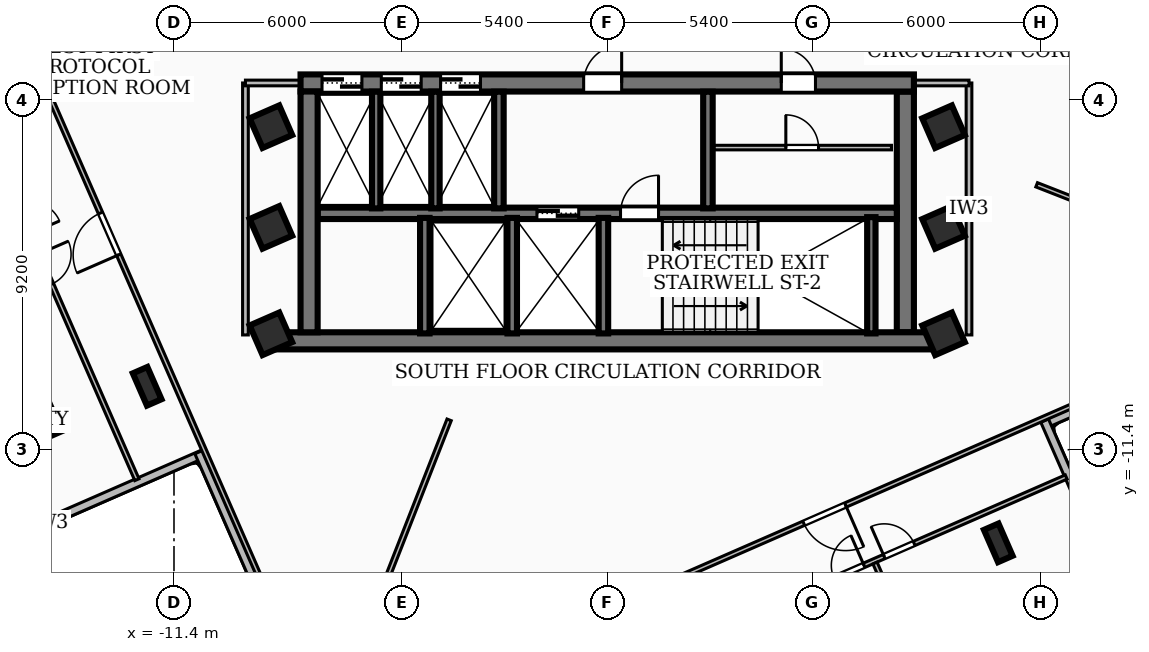
"""IFC4 building model, lengths in metres.
Left out: names, types, materials, properties, quantities, classifications, styles, units other than length and angle.
Written with IfcOpenShell. Run it as: python <this file> out.ifc"""

import sys

from ifc_helpers import new_model, si_unit, direction, frame, frame_2d, origin, origin_2d, place, context, subcontext, project, spatial, rectangle, i_section, extrude, element, fill, save


model = new_model("IFC4")
c1 = context("Model", 3, precision=1e-05, world=origin(), true_north=direction((0.0, 1.0)))
c2 = subcontext(c1, "Body", "Model", "MODEL_VIEW")
j1 = project(units=[si_unit("LENGTHUNIT", "METRE"), si_unit("PLANEANGLEUNIT", "RADIAN")], contexts=[c1])
p1 = place(None, origin())
s1 = spatial("IfcSite", under=j1, at=p1, CompositionType="ELEMENT")
p2 = place(p1, origin())
s2 = spatial("IfcBuilding", under=s1, at=p2, CompositionType="ELEMENT")
p3 = place(p2, frame((0.0, 0.0, 181.08)))
s3 = spatial("IfcBuildingStorey", under=s2, at=p3, CompositionType="ELEMENT", Elevation=181.08)
p4 = place(p3, frame((8.78, -8.535, 0.0), z_axis=(0.0, 0.0, 1.0), x_axis=(-1.0, 0.0, 0.0)))
e1 = element("IfcWall", 1, at=p4, inside=s3, PredefinedType="SHEAR", context=c2, shape_type="SweptSolid", body=[
    extrude(rectangle(XDim=17.56, YDim=0.45, at=frame_2d((8.78, 0.0))), origin(), (0.0, 0.0, 1.0), 3.34),
])
p5 = place(p3, frame((-8.07, -1.75, 0.0), z_axis=(0.0, 0.0, 1.0), x_axis=(1.0, 0.0, 0.0)))
e2 = element("IfcWall", 2, at=p5, inside=s3, PredefinedType="SHEAR", context=c2, shape_type="SweptSolid", body=[
    extrude(rectangle(XDim=16.14, YDim=0.45, at=frame_2d((8.07, 0.0))), origin(), (0.0, 0.0, 1.0), 3.34),
])
p6 = place(p5, frame((7.45, 0.0, 0.0)))
e3 = element("IfcOpeningElement", 3, at=p6, cuts=e2, PredefinedType="OPENING", context=c2, shape_type="SweptSolid", body=[
    extrude(rectangle(XDim=1.0, YDim=2.1, at=frame_2d((0.5, 1.05))), frame((0.0, 0.235, 0.0), z_axis=(0.0, -1.0, 0.0), x_axis=(1.0, 0.0, 0.0)), (0.0, 0.0, 1.0), 0.47),
])
p7 = place(p5, frame((12.65, 0.0, 0.0)))
e4 = element("IfcOpeningElement", 4, at=p7, cuts=e2, PredefinedType="OPENING", context=c2, shape_type="SweptSolid", body=[
    extrude(rectangle(XDim=0.9, YDim=2.06, at=frame_2d((0.45, 1.03))), frame((0.0, 0.235, 0.0), z_axis=(0.0, -1.0, 0.0), x_axis=(1.0, 0.0, 0.0)), (0.0, 0.0, 1.0), 0.47),
])
p8 = place(p5, frame((0.565, 0.0, 0.0)))
e5 = element("IfcOpeningElement", 5, at=p8, cuts=e2, PredefinedType="OPENING", context=c2, shape_type="SweptSolid", body=[
    extrude(rectangle(XDim=1.05, YDim=2.15, at=frame_2d((0.525, 1.075))), frame((0.0, 0.235, 0.0), z_axis=(0.0, -1.0, 0.0), x_axis=(1.0, 0.0, 0.0)), (0.0, 0.0, 1.0), 0.47),
])
p9 = place(p5, frame((2.125, 0.0, 0.0)))
e6 = element("IfcOpeningElement", 6, at=p9, cuts=e2, PredefinedType="OPENING", context=c2, shape_type="SweptSolid", body=[
    extrude(rectangle(XDim=1.05, YDim=2.15, at=frame_2d((0.525, 1.075))), frame((0.0, 0.235, 0.0), z_axis=(0.0, -1.0, 0.0), x_axis=(1.0, 0.0, 0.0)), (0.0, 0.0, 1.0), 0.47),
])
p10 = place(p5, frame((3.685, 0.0, 0.0)))
e7 = element("IfcOpeningElement", 7, at=p10, cuts=e2, PredefinedType="OPENING", context=c2, shape_type="SweptSolid", body=[
    extrude(rectangle(XDim=1.05, YDim=2.15, at=frame_2d((0.525, 1.075))), frame((0.0, 0.235, 0.0), z_axis=(0.0, -1.0, 0.0), x_axis=(1.0, 0.0, 0.0)), (0.0, 0.0, 1.0), 0.47),
])
for number, where, z_axis, x_axis in (
    (8, (-7.845, -8.31, 0.0), (0.0, 0.0, 1.0), (0.0, 1.0, 0.0)),
    (9, (7.845, -1.975, 0.0), (0.0, 0.0, 1.0), (0.0, -1.0, 0.0)),
):
    element("IfcWall", number, at=place(p3, frame(where, z_axis=z_axis, x_axis=x_axis)), inside=s3, PredefinedType="SHEAR", context=c2, shape_type="SweptSolid", body=[
        extrude(rectangle(XDim=6.335, YDim=0.45, at=frame_2d((3.167, 0.0))), origin(), (0.0, 0.0, 1.0), 3.34),
    ])
p11 = place(p3, frame((-7.62, -5.18, 0.0), z_axis=(0.0, 0.0, 1.0), x_axis=(1.0, 0.0, 0.0)))
e10 = element("IfcWall", 10, at=p11, inside=s3, PredefinedType="SOLIDWALL", context=c2, shape_type="SweptSolid", body=[
    extrude(rectangle(XDim=15.24, YDim=0.3, at=frame_2d((7.62, 0.0))), origin(), (0.0, 0.0, 1.0), 3.34),
])
p12 = place(p11, frame((5.77, 0.0, 0.0)))
e11 = element("IfcOpeningElement", 11, at=p12, cuts=e10, PredefinedType="OPENING", context=c2, shape_type="SweptSolid", body=[
    extrude(rectangle(XDim=1.1, YDim=2.15, at=frame_2d((0.55, 1.075))), frame((0.0, 0.16, 0.0), z_axis=(0.0, -1.0, 0.0), x_axis=(1.0, 0.0, 0.0)), (0.0, 0.0, 1.0), 0.32),
])
p13 = place(p11, frame((7.97, 0.0, 0.0)))
e12 = element("IfcOpeningElement", 12, at=p13, cuts=e10, PredefinedType="OPENING", context=c2, shape_type="SweptSolid", body=[
    extrude(rectangle(XDim=1.0, YDim=2.1, at=frame_2d((0.5, 1.05))), frame((0.0, 0.16, 0.0), z_axis=(0.0, -1.0, 0.0), x_axis=(1.0, 0.0, 0.0)), (0.0, 0.0, 1.0), 0.32),
])
p14 = place(p3, frame((6.95, -8.34, 0.0), z_axis=(0.0, 0.0, 1.0), x_axis=(0.0, 1.0, 0.0)))
e13 = element("IfcWall", 13, at=p14, inside=s3, PredefinedType="SOLIDWALL", context=c2, shape_type="SweptSolid", body=[
    extrude(rectangle(XDim=3.06, YDim=0.22, at=frame_2d((1.53, 0.0))), origin(), (0.0, 0.0, 1.0), 3.34),
])
for number, where, z_axis, x_axis in (
    (14, (-0.1, -8.34, 0.0), (0.0, 0.0, 1.0), (0.0, 1.0, 0.0)),
    (15, (-2.5, -8.34, 0.0), (0.0, 0.0, 1.0), (0.0, 1.0, 0.0)),
    (16, (-4.8, -8.34, 0.0), (0.0, 0.0, 1.0), (0.0, 1.0, 0.0)),
):
    element("IfcWall", number, at=place(p3, frame(where, z_axis=z_axis, x_axis=x_axis)), inside=s3, PredefinedType="SOLIDWALL", context=c2, shape_type="SweptSolid", body=[
        extrude(rectangle(XDim=3.04, YDim=0.25, at=frame_2d((1.52, 0.0))), origin(), (0.0, 0.0, 1.0), 3.34),
    ])
for number, where, z_axis, x_axis in (
    (17, (-2.85, -5.05, 0.0), (0.0, 0.0, 1.0), (0.0, 1.0, 0.0)),
    (18, (2.65, -5.05, 0.0), (0.0, 0.0, 1.0), (0.0, 1.0, 0.0)),
):
    element("IfcWall", number, at=place(p3, frame(where, z_axis=z_axis, x_axis=x_axis)), inside=s3, PredefinedType="SOLIDWALL", context=c2, shape_type="SweptSolid", body=[
        extrude(rectangle(XDim=3.07, YDim=0.25, at=frame_2d((1.535, 0.0))), origin(), (0.0, 0.0, 1.0), 3.34),
    ])
for number, where, z_axis, x_axis in (
    (19, (-6.08, -5.05, 0.0), (0.0, 0.0, 1.0), (0.0, 1.0, 0.0)),
    (20, (-4.52, -5.05, 0.0), (0.0, 0.0, 1.0), (0.0, 1.0, 0.0)),
):
    element("IfcWall", number, at=place(p3, frame(where, z_axis=z_axis, x_axis=x_axis)), inside=s3, PredefinedType="SOLIDWALL", context=c2, shape_type="SweptSolid", body=[
        extrude(rectangle(XDim=3.07, YDim=0.22, at=frame_2d((1.535, 0.0))), origin(), (0.0, 0.0, 1.0), 3.34),
    ])
for number, where, z_axis, x_axis in (
    (21, (-8.85, -5.55, 0.0), (0.0, 0.0, 1.0), (0.916, 0.4, 0.0)),
    (22, (-8.85, -2.9, 0.0), (0.0, 0.0, 1.0), (0.916, 0.4, 0.0)),
    (23, (8.85, -5.55, 0.0), (0.0, 0.0, 1.0), (0.916, 0.4, 0.0)),
    (24, (8.85, -2.9, 0.0), (0.0, 0.0, 1.0), (0.916, 0.4, 0.0)),
    (25, (8.85, -8.35, 0.0), (0.0, 0.0, 1.0), (0.916, 0.4, 0.0)),
    (26, (-8.85, -8.35, 0.0), (0.0, 0.0, 1.0), (0.916, 0.4, 0.0)),
):
    element("IfcColumn", number, at=place(p3, frame(where, z_axis=z_axis, x_axis=x_axis)), inside=s3, PredefinedType="COLUMN", context=c2, shape_type="SweptSolid", body=[
        extrude(rectangle(XDim=0.85, YDim=0.85, at=origin_2d()), origin(), (0.0, 0.0, 1.0), 3.6),
    ])
for number, where, z_axis, x_axis in (
    (27, (-12.106, -9.731, 0.0), (0.0, 0.0, 1.0), (0.916, 0.4, 0.0)),
    (28, (-14.731, -10.573, 0.0), (0.0, 0.0, 1.0), (0.916, 0.4, 0.0)),
    (29, (10.29, -13.85, 0.0), (0.0, 0.0, 1.0), (0.916, 0.4, 0.0)),
):
    element("IfcColumn", number, at=place(p3, frame(where, z_axis=z_axis, x_axis=x_axis)), inside=s3, PredefinedType="COLUMN", context=c2, shape_type="SweptSolid", body=[
        extrude(i_section(OverallWidth=0.418, OverallDepth=0.927, WebThickness=0.019, FlangeThickness=0.032, at=origin_2d()), origin(), (0.0, 0.0, 1.0), 3.6),
    ])
p15 = place(p3, frame((-10.634, -11.51, 0.0), z_axis=(0.0, 0.0, 1.0), x_axis=(-0.91637186732, -0.400328116405, 0.0)))
e30 = element("IfcWall", 30, at=p15, inside=s3, PredefinedType="SOLIDWALL", context=c2, shape_type="SweptSolid", body=[
    extrude(rectangle(XDim=9.058, YDim=0.22, at=frame_2d((4.529, 0.0))), origin(), (0.0, 0.0, 1.0), 3.34),
])
p16 = place(p15, frame((6.157, 0.0, 0.85)))
e31 = element("IfcOpeningElement", 31, at=p16, cuts=e30, PredefinedType="OPENING", context=c2, shape_type="SweptSolid", body=[
    extrude(rectangle(XDim=1.8, YDim=1.8, at=frame_2d((0.9, 0.9))), frame((0.0, 0.12, 0.0), z_axis=(0.0, -1.0, 0.0), x_axis=(1.0, 0.0, 0.0)), (0.0, 0.0, 1.0), 0.24),
])
p17 = place(p3, frame((17.658, -8.044, 0.0), z_axis=(0.0, 0.0, 1.0), x_axis=(-0.916361145567, -0.400352658158, 0.0)))
e32 = element("IfcWall", 32, at=p17, inside=s3, PredefinedType="SOLIDWALL", context=c2, shape_type="SweptSolid", body=[
    extrude(rectangle(XDim=6.759, YDim=0.22, at=frame_2d((3.38, 0.0))), origin(), (0.0, 0.0, 1.0), 3.34),
])
p18 = place(p3, frame((11.51, -10.634, 0.0), z_axis=(0.0, 0.0, 1.0), x_axis=(0.400392901903, -0.916343562266, 0.0)))
e33 = element("IfcWall", 33, at=p18, inside=s3, PredefinedType="SOLIDWALL", context=c2, shape_type="SweptSolid", body=[
    extrude(rectangle(XDim=7.458, YDim=0.22, at=frame_2d((3.729, 0.0))), origin(), (0.0, 0.0, 1.0), 3.34),
])
p19 = place(p3, frame((-8.044, -17.658, 0.0), z_axis=(0.0, 0.0, 1.0), x_axis=(-0.400352658158, 0.916361145567, 0.0)))
e34 = element("IfcWall", 34, at=p19, inside=s3, PredefinedType="SOLIDWALL", context=c2, shape_type="SweptSolid", body=[
    extrude(rectangle(XDim=6.759, YDim=0.22, at=frame_2d((3.38, 0.0))), origin(), (0.0, 0.0, 1.0), 3.34),
])
p20 = place(p3, frame((2.8, -3.45, 0.0), z_axis=(0.0, 0.0, 1.0), x_axis=(1.0, 0.0, 0.0)))
e35 = element("IfcWall", 35, at=p20, inside=s3, PredefinedType="PARTITIONING", context=c2, shape_type="SweptSolid", body=[
    extrude(rectangle(XDim=4.68, YDim=0.12, at=frame_2d((2.34, 0.0))), origin(), (0.0, 0.0, 1.0), 3.34),
])
p21 = place(p20, frame((1.9, 0.0, 0.0)))
e36 = element("IfcOpeningElement", 36, at=p21, cuts=e35, PredefinedType="OPENING", context=c2, shape_type="SweptSolid", body=[
    extrude(rectangle(XDim=0.86, YDim=2.04, at=frame_2d((0.43, 1.02))), frame((0.0, 0.07, 0.0), z_axis=(0.0, -1.0, 0.0), x_axis=(1.0, 0.0, 0.0)), (0.0, 0.0, 1.0), 0.14),
])
p22 = place(p3, frame((-9.52, -8.38, 0.0), z_axis=(0.0, 0.0, 1.0), x_axis=(0.0, 1.0, 0.0)))
e37 = element("IfcWall", 37, at=p22, inside=s3, PredefinedType="PARTITIONING", context=c2, shape_type="SweptSolid", body=[
    extrude(rectangle(XDim=6.63, YDim=0.15, at=frame_2d((3.315, 0.0))), origin(), (0.0, 0.0, 1.0), 2.644),
])
p23 = place(p3, frame((-7.85, -1.75, 0.0), z_axis=(0.0, 0.0, 1.0), x_axis=(-1.0, 0.0, 0.0)))
e38 = element("IfcWall", 38, at=p23, inside=s3, PredefinedType="PARTITIONING", context=c2, shape_type="SweptSolid", body=[
    extrude(rectangle(XDim=1.67, YDim=0.15, at=frame_2d((0.835, 0.0))), origin(), (0.0, 0.0, 1.0), 2.57),
])
p24 = place(p3, frame((9.52, -8.38, 0.0), z_axis=(0.0, 0.0, 1.0), x_axis=(0.0, 1.0, 0.0)))
e39 = element("IfcWall", 39, at=p24, inside=s3, PredefinedType="PARTITIONING", context=c2, shape_type="SweptSolid", body=[
    extrude(rectangle(XDim=6.63, YDim=0.15, at=frame_2d((3.315, 0.0))), origin(), (0.0, 0.0, 1.0), 3.34),
])
p25 = place(p3, frame((7.85, -1.75, 0.0), z_axis=(0.0, 0.0, 1.0), x_axis=(1.0, 0.0, 0.0)))
e40 = element("IfcWall", 40, at=p25, inside=s3, PredefinedType="PARTITIONING", context=c2, shape_type="SweptSolid", body=[
    extrude(rectangle(XDim=1.67, YDim=0.15, at=frame_2d((0.835, 0.0))), origin(), (0.0, 0.0, 1.0), 2.57),
])
p26 = place(p3, frame((-4.16, -10.614, 0.0), z_axis=(0.0, 0.0, 1.0), x_axis=(-0.364859873544, -0.931062442953, 0.0)))
e41 = element("IfcWall", 41, at=p26, inside=s3, PredefinedType="PARTITIONING", context=c2, shape_type="SweptSolid", body=[
    extrude(rectangle(XDim=8.274, YDim=0.12, at=frame_2d((4.137, 0.0))), origin(), (0.0, 0.0, 1.0), 3.34),
])
p27 = place(p3, frame((11.3, -4.429, 0.0), z_axis=(0.0, 0.0, 1.0), x_axis=(0.931071596241, -0.364836514995, 0.0)))
e42 = element("IfcWall", 42, at=p27, inside=s3, PredefinedType="PARTITIONING", context=c2, shape_type="SweptSolid", body=[
    extrude(rectangle(XDim=7.538, YDim=0.12, at=frame_2d((3.769, 0.0))), origin(), (0.0, 0.0, 1.0), 3.34),
])
p28 = place(p3, frame((8.915, 15.288, 0.0), z_axis=(0.0, 0.0, 1.0), x_axis=(0.400335531383, -0.916368627962, 0.0)))
e43 = element("IfcWall", 43, at=p28, inside=s3, PredefinedType="PARTITIONING", context=c2, shape_type="SweptSolid", body=[
    extrude(rectangle(XDim=20.46, YDim=0.12, at=frame_2d((10.23, 0.0))), origin(), (0.0, 0.0, 1.0), 2.644),
])
p29 = place(p28, frame((9.84, 0.0, 0.0)))
e44 = element("IfcOpeningElement", 44, at=p29, cuts=e43, PredefinedType="OPENING", context=c2, shape_type="SweptSolid", body=[
    extrude(rectangle(XDim=1.2, YDim=2.1, at=frame_2d((0.6, 1.05))), frame((0.0, 0.07, 0.0), z_axis=(0.0, -1.0, 0.0), x_axis=(1.0, 0.0, 0.0)), (0.0, 0.0, 1.0), 0.14),
])
p30 = place(p3, frame((-8.915, -15.288, 0.0), z_axis=(0.0, 0.0, 1.0), x_axis=(-0.400335531383, 0.916368627962, 0.0)))
e45 = element("IfcWall", 45, at=p30, inside=s3, PredefinedType="PARTITIONING", context=c2, shape_type="SweptSolid", body=[
    extrude(rectangle(XDim=20.46, YDim=0.12, at=frame_2d((10.23, 0.0))), origin(), (0.0, 0.0, 1.0), 2.644),
])
p31 = place(p30, frame((9.84, 0.0, 0.0)))
e46 = element("IfcOpeningElement", 46, at=p31, cuts=e45, PredefinedType="OPENING", context=c2, shape_type="SweptSolid", body=[
    extrude(rectangle(XDim=1.2, YDim=2.1, at=frame_2d((0.6, 1.05))), frame((0.0, 0.07, 0.0), z_axis=(0.0, -1.0, 0.0), x_axis=(1.0, 0.0, 0.0)), (0.0, 0.0, 1.0), 0.14),
])
p32 = place(p3, frame((-17.52, -0.414, 0.0), z_axis=(0.0, 0.0, 1.0), x_axis=(0.400330383156, -0.916370877059, 0.0)))
e47 = element("IfcWall", 47, at=p32, inside=s3, PredefinedType="PARTITIONING", context=c2, shape_type="SweptSolid", body=[
    extrude(rectangle(XDim=12.85, YDim=0.12, at=frame_2d((6.425, 0.0))), origin(), (0.0, 0.0, 1.0), 2.644),
])
p33 = place(p32, frame((4.935, 0.0, 0.0)))
e48 = element("IfcOpeningElement", 48, at=p33, cuts=e47, PredefinedType="OPENING", context=c2, shape_type="SweptSolid", body=[
    extrude(rectangle(XDim=0.86, YDim=2.04, at=frame_2d((0.43, 1.02))), frame((0.0, 0.07, 0.0), z_axis=(0.0, -1.0, 0.0), x_axis=(1.0, 0.0, 0.0)), (0.0, 0.0, 1.0), 0.14),
])
p34 = place(p32, frame((6.375, 0.0, 0.0)))
e49 = element("IfcOpeningElement", 49, at=p34, cuts=e47, PredefinedType="OPENING", context=c2, shape_type="SweptSolid", body=[
    extrude(rectangle(XDim=0.86, YDim=2.04, at=frame_2d((0.43, 1.02))), frame((0.0, 0.07, 0.0), z_axis=(0.0, -1.0, 0.0), x_axis=(1.0, 0.0, 0.0)), (0.0, 0.0, 1.0), 0.14),
])
p35 = place(p3, frame((15.288, -8.915, 0.0), z_axis=(0.0, 0.0, 1.0), x_axis=(-0.916368627962, -0.400335531383, 0.0)))
e50 = element("IfcWall", 50, at=p35, inside=s3, PredefinedType="PARTITIONING", context=c2, shape_type="SweptSolid", body=[
    extrude(rectangle(XDim=20.46, YDim=0.12, at=frame_2d((10.23, 0.0))), origin(), (0.0, 0.0, 1.0), 2.644),
])
p36 = place(p35, frame((9.84, 0.0, 0.0)))
e51 = element("IfcOpeningElement", 51, at=p36, cuts=e50, PredefinedType="OPENING", context=c2, shape_type="SweptSolid", body=[
    extrude(rectangle(XDim=1.2, YDim=2.1, at=frame_2d((0.6, 1.05))), frame((0.0, 0.07, 0.0), z_axis=(0.0, -1.0, 0.0), x_axis=(1.0, 0.0, 0.0)), (0.0, 0.0, 1.0), 0.14),
])
p37 = place(p3, frame((7.047, -14.382, 0.0), z_axis=(0.0, 0.0, 1.0), x_axis=(0.400431798825, -0.916326565417, 0.0)))
e52 = element("IfcWall", 52, at=p37, inside=s3, PredefinedType="PARTITIONING", context=c2, shape_type="SweptSolid", body=[
    extrude(rectangle(XDim=7.215, YDim=0.12, at=frame_2d((3.607, 0.0))), origin(), (0.0, 0.0, 1.0), 3.34),
])
p38 = place(p3, frame((0.301, -17.263, 0.0), z_axis=(0.0, 0.0, 1.0), x_axis=(0.916355177322, 0.400366318507, 0.0)))
e53 = element("IfcWall", 53, at=p38, inside=s3, PredefinedType="PARTITIONING", context=c2, shape_type="SweptSolid", body=[
    extrude(rectangle(XDim=12.851, YDim=0.12, at=frame_2d((6.425, 0.0))), origin(), (0.0, 0.0, 1.0), 2.644),
])
p39 = place(p38, frame((6.185, 0.0, 0.0)))
e54 = element("IfcOpeningElement", 54, at=p39, cuts=e53, PredefinedType="OPENING", context=c2, shape_type="SweptSolid", body=[
    extrude(rectangle(XDim=0.86, YDim=2.04, at=frame_2d((0.43, 1.02))), frame((0.0, 0.07, 0.0), z_axis=(0.0, -1.0, 0.0), x_axis=(1.0, 0.0, 0.0)), (0.0, 0.0, 1.0), 0.14),
])
p40 = place(p38, frame((7.625, 0.0, 0.0)))
e55 = element("IfcOpeningElement", 55, at=p40, cuts=e53, PredefinedType="OPENING", context=c2, shape_type="SweptSolid", body=[
    extrude(rectangle(XDim=0.86, YDim=2.04, at=frame_2d((0.43, 1.02))), frame((0.0, 0.07, 0.0), z_axis=(0.0, -1.0, 0.0), x_axis=(1.0, 0.0, 0.0)), (0.0, 0.0, 1.0), 0.14),
])
p41 = place(p6, origin())
e56 = element("IfcDoor", 56, at=p41, inside=s3, OperationType="SINGLE_SWING_RIGHT", PredefinedType="DOOR", context=c2, shape_type="SweptSolid", body=[
    extrude(rectangle(XDim=1.0, YDim=2.1, at=frame_2d((0.5, 1.05))), frame((0.0, 0.025, 0.0), z_axis=(0.0, -1.0, 0.0), x_axis=(1.0, 0.0, 0.0)), (0.0, 0.0, 1.0), 0.05),
])
fill(e3, e56)
p42 = place(p12, origin())
e57 = element("IfcDoor", 57, at=p42, inside=s3, OperationType="DOUBLE_DOOR_SLIDING", PredefinedType="DOOR", context=c2, shape_type="SweptSolid", body=[
    extrude(rectangle(XDim=1.1, YDim=2.15, at=frame_2d((0.55, 1.075))), frame((0.0, 0.025, 0.0), z_axis=(0.0, -1.0, 0.0), x_axis=(1.0, 0.0, 0.0)), (0.0, 0.0, 1.0), 0.05),
])
fill(e11, e57)
p43 = place(p13, origin())
e58 = element("IfcDoor", 58, at=p43, inside=s3, OperationType="SINGLE_SWING_RIGHT", PredefinedType="DOOR", context=c2, shape_type="SweptSolid", body=[
    extrude(rectangle(XDim=1.0, YDim=2.1, at=frame_2d((0.5, 1.05))), frame((0.0, 0.025, 0.0), z_axis=(0.0, -1.0, 0.0), x_axis=(1.0, 0.0, 0.0)), (0.0, 0.0, 1.0), 0.05),
])
fill(e12, e58)
p44 = place(p7, origin())
e59 = element("IfcDoor", 59, at=p44, inside=s3, OperationType="SINGLE_SWING_LEFT", PredefinedType="DOOR", context=c2, shape_type="SweptSolid", body=[
    extrude(rectangle(XDim=0.9, YDim=2.06, at=frame_2d((0.45, 1.03))), frame((0.0, 0.025, 0.0), z_axis=(0.0, -1.0, 0.0), x_axis=(1.0, 0.0, 0.0)), (0.0, 0.0, 1.0), 0.05),
])
fill(e4, e59)
p45 = place(p8, origin())
e60 = element("IfcDoor", 60, at=p45, inside=s3, OperationType="DOUBLE_DOOR_SLIDING", PredefinedType="DOOR", context=c2, shape_type="SweptSolid", body=[
    extrude(rectangle(XDim=1.05, YDim=2.15, at=frame_2d((0.525, 1.075))), frame((0.0, 0.025, 0.0), z_axis=(0.0, -1.0, 0.0), x_axis=(1.0, 0.0, 0.0)), (0.0, 0.0, 1.0), 0.05),
])
fill(e5, e60)
p46 = place(p9, origin())
e61 = element("IfcDoor", 61, at=p46, inside=s3, OperationType="DOUBLE_DOOR_SLIDING", PredefinedType="DOOR", context=c2, shape_type="SweptSolid", body=[
    extrude(rectangle(XDim=1.05, YDim=2.15, at=frame_2d((0.525, 1.075))), frame((0.0, 0.025, 0.0), z_axis=(0.0, -1.0, 0.0), x_axis=(1.0, 0.0, 0.0)), (0.0, 0.0, 1.0), 0.05),
])
fill(e6, e61)
p47 = place(p10, origin())
e62 = element("IfcDoor", 62, at=p47, inside=s3, OperationType="DOUBLE_DOOR_SLIDING", PredefinedType="DOOR", context=c2, shape_type="SweptSolid", body=[
    extrude(rectangle(XDim=1.05, YDim=2.15, at=frame_2d((0.525, 1.075))), frame((0.0, 0.025, 0.0), z_axis=(0.0, -1.0, 0.0), x_axis=(1.0, 0.0, 0.0)), (0.0, 0.0, 1.0), 0.05),
])
fill(e7, e62)
p48 = place(p21, origin())
e63 = element("IfcDoor", 63, at=p48, inside=s3, OperationType="SINGLE_SWING_LEFT", PredefinedType="DOOR", context=c2, shape_type="SweptSolid", body=[
    extrude(rectangle(XDim=0.86, YDim=2.04, at=frame_2d((0.43, 1.02))), frame((0.0, 0.025, 0.0), z_axis=(0.0, -1.0, 0.0), x_axis=(1.0, 0.0, 0.0)), (0.0, 0.0, 1.0), 0.05),
])
fill(e36, e63)
p49 = place(p31, origin())
e64 = element("IfcDoor", 64, at=p49, inside=s3, OperationType="SINGLE_SWING_LEFT", PredefinedType="DOOR", context=c2, shape_type="SweptSolid", body=[
    extrude(rectangle(XDim=1.2, YDim=2.1, at=frame_2d((0.6, 1.05))), frame((0.0, 0.025, 0.0), z_axis=(0.0, -1.0, 0.0), x_axis=(1.0, 0.0, 0.0)), (0.0, 0.0, 1.0), 0.05),
])
fill(e46, e64)
p50 = place(p34, origin())
e65 = element("IfcDoor", 65, at=p50, inside=s3, OperationType="SINGLE_SWING_LEFT", PredefinedType="DOOR", context=c2, shape_type="SweptSolid", body=[
    extrude(rectangle(XDim=0.86, YDim=2.04, at=frame_2d((0.43, 1.02))), frame((0.0, 0.025, 0.0), z_axis=(0.0, -1.0, 0.0), x_axis=(1.0, 0.0, 0.0)), (0.0, 0.0, 1.0), 0.05),
])
fill(e49, e65)
p51 = place(p36, origin())
e66 = element("IfcDoor", 66, at=p51, inside=s3, OperationType="SINGLE_SWING_LEFT", PredefinedType="DOOR", context=c2, shape_type="SweptSolid", body=[
    extrude(rectangle(XDim=1.2, YDim=2.1, at=frame_2d((0.6, 1.05))), frame((0.0, 0.025, 0.0), z_axis=(0.0, -1.0, 0.0), x_axis=(1.0, 0.0, 0.0)), (0.0, 0.0, 1.0), 0.05),
])
fill(e51, e66)
p52 = place(p39, origin())
e67 = element("IfcDoor", 67, at=p52, inside=s3, OperationType="SINGLE_SWING_RIGHT", PredefinedType="DOOR", context=c2, shape_type="SweptSolid", body=[
    extrude(rectangle(XDim=0.86, YDim=2.04, at=frame_2d((0.43, 1.02))), frame((0.0, 0.025, 0.0), z_axis=(0.0, -1.0, 0.0), x_axis=(1.0, 0.0, 0.0)), (0.0, 0.0, 1.0), 0.05),
])
fill(e54, e67)
p53 = place(p40, origin())
e68 = element("IfcDoor", 68, at=p53, inside=s3, OperationType="SINGLE_SWING_LEFT", PredefinedType="DOOR", context=c2, shape_type="SweptSolid", body=[
    extrude(rectangle(XDim=0.86, YDim=2.04, at=frame_2d((0.43, 1.02))), frame((0.0, 0.025, 0.0), z_axis=(0.0, -1.0, 0.0), x_axis=(1.0, 0.0, 0.0)), (0.0, 0.0, 1.0), 0.05),
])
fill(e55, e68)
save(model, sys.argv[1])
